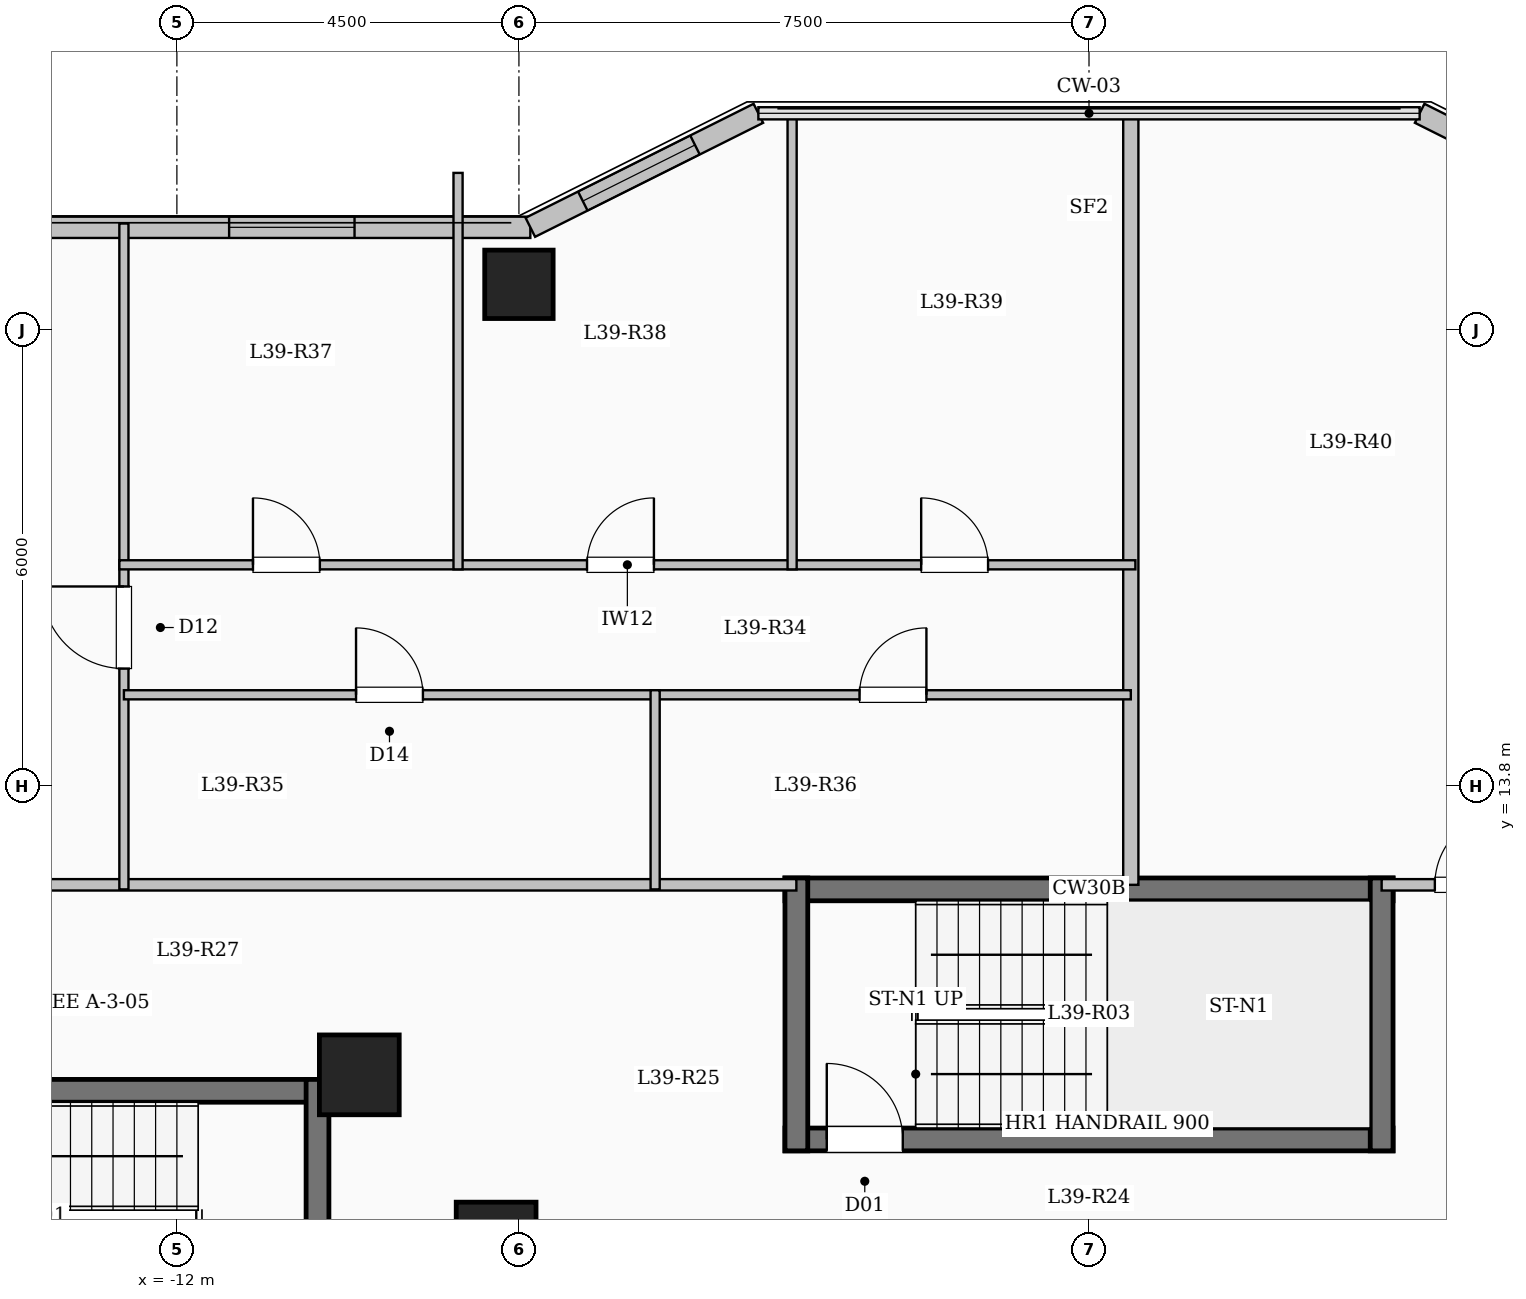
"""IFC4 building model, lengths in metres.
Left out: names, types, materials, properties, quantities, classifications, styles, units other than length and angle.
Written with IfcOpenShell. Run it as: python <this file> out.ifc"""

import sys

from ifc_helpers import new_model, si_unit, direction, frame, frame_2d, origin, origin_2d, place, context, subcontext, project, spatial, rectangle, extrude, element, fill, save


model = new_model("IFC4")
c1 = context("Model", 3, precision=1e-05, world=origin(), true_north=direction((0.0, 1.0)))
c2 = subcontext(c1, "Body", "Model", "MODEL_VIEW")
j1 = project(units=[si_unit("LENGTHUNIT", "METRE"), si_unit("PLANEANGLEUNIT", "RADIAN")], contexts=[c1])
p1 = place(None, origin())
s1 = spatial("IfcSite", under=j1, at=p1, CompositionType="ELEMENT")
p2 = place(p1, origin())
s2 = spatial("IfcBuilding", under=s1, at=p2, CompositionType="ELEMENT")
p3 = place(p2, frame((0.0, 0.0, 146.0)))
s3 = spatial("IfcBuildingStorey", under=s2, at=p3, CompositionType="ELEMENT", Elevation=146.0)
for number, where, z_axis, x_axis in (
    (1, (-7.8, 7.8, 0.0), (0.0, 0.0, 1.0), (1.0, 0.0, 0.0)),
    (2, (-9.6, 10.0, 0.0), (0.0, 0.0, 1.0), (1.0, 0.0, 0.0)),
):
    element("IfcColumn", number, at=place(p3, frame(where, z_axis=z_axis, x_axis=x_axis)), inside=s3, PredefinedType="COLUMN", context=c2, shape_type="SweptSolid", body=[
        extrude(rectangle(XDim=1.05, YDim=1.05, at=origin_2d()), origin(), (0.0, 0.0, 1.0), 3.35),
    ])
p4 = place(p3, frame((-7.5, 20.4, 0.0), z_axis=(0.0, 0.0, 1.0), x_axis=(1.0, 0.0, 0.0)))
e3 = element("IfcColumn", 3, at=p4, inside=s3, PredefinedType="COLUMN", context=c2, shape_type="SweptSolid", body=[
    extrude(rectangle(XDim=0.9, YDim=0.9, at=origin_2d()), origin(), (0.0, 0.0, 1.0), 3.35),
])
p5 = place(p3, frame((-19.65, 21.15, 0.0), z_axis=(0.0, 0.0, 1.0), x_axis=(1.0, 0.0, 0.0)))
e4 = element("IfcWall", 4, at=p5, inside=s3, PredefinedType="SOLIDWALL", context=c2, shape_type="SweptSolid", body=[
    extrude(rectangle(XDim=12.3, YDim=0.28, at=frame_2d((6.15, 0.0))), origin(), (0.0, 0.0, 1.0), 3.1),
])
p6 = place(p5, frame((2.414, 0.0, 0.9)))
e5 = element("IfcOpeningElement", 5, at=p6, cuts=e4, PredefinedType="OPENING", context=c2, shape_type="SweptSolid", body=[
    extrude(rectangle(XDim=2.2, YDim=1.75, at=frame_2d((1.1, 0.875))), frame((0.0, 0.15, 0.0), z_axis=(0.0, -1.0, 0.0), x_axis=(1.0, 0.0, 0.0)), (0.0, 0.0, 1.0), 0.3),
])
p7 = place(p5, frame((8.337, 0.0, 0.9)))
e6 = element("IfcOpeningElement", 6, at=p7, cuts=e4, PredefinedType="OPENING", context=c2, shape_type="SweptSolid", body=[
    extrude(rectangle(XDim=1.65, YDim=1.6, at=frame_2d((0.825, 0.8))), frame((0.0, 0.15, 0.0), z_axis=(0.0, -1.0, 0.0), x_axis=(1.0, 0.0, 0.0)), (0.0, 0.0, 1.0), 0.3),
])
p8 = place(p3, frame((-7.35, 21.15, 0.0), z_axis=(0.0, 0.0, 1.0), x_axis=(0.894427191, 0.4472135955, 0.0)))
e7 = element("IfcWall", 7, at=p8, inside=s3, PredefinedType="SOLIDWALL", context=c2, shape_type="SweptSolid", body=[
    extrude(rectangle(XDim=3.354, YDim=0.28, at=frame_2d((1.677, 0.0))), origin(), (0.0, 0.0, 1.0), 3.1),
])
p9 = place(p8, frame((0.772, 0.0, 0.9)))
e8 = element("IfcOpeningElement", 8, at=p9, cuts=e7, PredefinedType="OPENING", context=c2, shape_type="SweptSolid", body=[
    extrude(rectangle(XDim=1.65, YDim=1.6, at=frame_2d((0.825, 0.8))), frame((0.0, 0.15, 0.0), z_axis=(0.0, -1.0, 0.0), x_axis=(1.0, 0.0, 0.0)), (0.0, 0.0, 1.0), 0.3),
])
p10 = place(p3, frame((4.35, 22.65, 0.0), z_axis=(0.0, 0.0, 1.0), x_axis=(0.894427191, -0.4472135955, 0.0)))
e9 = element("IfcWall", 9, at=p10, inside=s3, PredefinedType="SOLIDWALL", context=c2, shape_type="SweptSolid", body=[
    extrude(rectangle(XDim=3.354, YDim=0.28, at=frame_2d((1.677, 0.0))), origin(), (0.0, 0.0, 1.0), 3.1),
])
p11 = place(p10, frame((1.653, 0.0, 0.95)))
e10 = element("IfcOpeningElement", 10, at=p11, cuts=e9, PredefinedType="OPENING", context=c2, shape_type="SweptSolid", body=[
    extrude(rectangle(XDim=1.2, YDim=1.5, at=frame_2d((0.6, 0.75))), frame((0.0, 0.15, 0.0), z_axis=(0.0, -1.0, 0.0), x_axis=(1.0, 0.0, 0.0)), (0.0, 0.0, 1.0), 0.3),
])
p12 = place(p3, frame((-18.0, 9.79, 0.0), z_axis=(0.0, 0.0, 1.0), x_axis=(1.0, 0.0, 0.0)))
e11 = element("IfcWall", 11, at=p12, inside=s3, PredefinedType="SHEAR", context=c2, shape_type="SweptSolid", body=[
    extrude(rectangle(XDim=8.0, YDim=0.3, at=frame_2d((4.0, 0.0))), origin(), (0.0, 0.0, 1.0), 3.35),
])
p13 = place(p3, frame((-10.15, 6.35, 0.0), z_axis=(0.0, 0.0, 1.0), x_axis=(0.0, 1.0, 0.0)))
e12 = element("IfcWall", 12, at=p13, inside=s3, PredefinedType="SHEAR", context=c2, shape_type="SweptSolid", body=[
    extrude(rectangle(XDim=3.59, YDim=0.3, at=frame_2d((1.795, 0.0))), origin(), (0.0, 0.0, 1.0), 3.35),
])
p14 = place(p3, frame((-4.0, 12.44, 0.0), z_axis=(0.0, 0.0, 1.0), x_axis=(1.0, 0.0, 0.0)))
e13 = element("IfcWall", 13, at=p14, inside=s3, PredefinedType="SHEAR", context=c2, shape_type="SweptSolid", body=[
    extrude(rectangle(XDim=8.0, YDim=0.3, at=frame_2d((4.0, 0.0))), origin(), (0.0, 0.0, 1.0), 3.35),
])
p15 = place(p3, frame((-4.0, 9.15, 0.0), z_axis=(0.0, 0.0, 1.0), x_axis=(1.0, 0.0, 0.0)))
e14 = element("IfcWall", 14, at=p15, inside=s3, PredefinedType="SHEAR", context=c2, shape_type="SweptSolid", body=[
    extrude(rectangle(XDim=8.0, YDim=0.3, at=frame_2d((4.0, 0.0))), origin(), (0.0, 0.0, 1.0), 3.35),
])
p16 = place(p15, frame((0.55, 0.0, 0.0)))
e15 = element("IfcOpeningElement", 15, at=p16, cuts=e14, PredefinedType="OPENING", context=c2, shape_type="SweptSolid", body=[
    extrude(rectangle(XDim=1.0, YDim=2.15, at=frame_2d((0.5, 1.075))), frame((0.0, 0.16, 0.0), z_axis=(0.0, -1.0, 0.0), x_axis=(1.0, 0.0, 0.0)), (0.0, 0.0, 1.0), 0.32),
])
for number, where, z_axis, x_axis in (
    (16, (-3.85, 9.0, 0.0), (0.0, 0.0, 1.0), (0.0, 1.0, 0.0)),
    (17, (3.85, 9.0, 0.0), (0.0, 0.0, 1.0), (0.0, 1.0, 0.0)),
):
    element("IfcWall", number, at=place(p3, frame(where, z_axis=z_axis, x_axis=x_axis)), inside=s3, PredefinedType="SHEAR", context=c2, shape_type="SweptSolid", body=[
        extrude(rectangle(XDim=3.59, YDim=0.3, at=frame_2d((1.795, 0.0))), origin(), (0.0, 0.0, 1.0), 3.35),
    ])
p17 = place(p3, frame((-19.55, 12.5, 0.0), z_axis=(0.0, 0.0, 1.0), x_axis=(1.0, 0.0, 0.0)))
e18 = element("IfcWall", 18, at=p17, inside=s3, PredefinedType="PARTITIONING", context=c2, shape_type="SweptSolid", body=[
    extrude(rectangle(XDim=15.7, YDim=0.15, at=frame_2d((7.85, 0.0))), origin(), (0.0, 0.0, 1.0), 3.1),
])
p18 = place(p17, frame((0.7, 0.0, 0.0)))
e19 = element("IfcOpeningElement", 19, at=p18, cuts=e18, PredefinedType="OPENING", context=c2, shape_type="SweptSolid", body=[
    extrude(rectangle(XDim=0.96, YDim=2.15, at=frame_2d((0.48, 1.075))), frame((0.0, 0.085, 0.0), z_axis=(0.0, -1.0, 0.0), x_axis=(1.0, 0.0, 0.0)), (0.0, 0.0, 1.0), 0.17),
])
p19 = place(p3, frame((3.85, 12.5, 0.0), z_axis=(0.0, 0.0, 1.0), x_axis=(1.0, 0.0, 0.0)))
e20 = element("IfcWall", 20, at=p19, inside=s3, PredefinedType="PARTITIONING", context=c2, shape_type="SweptSolid", body=[
    extrude(rectangle(XDim=15.7, YDim=0.15, at=frame_2d((7.85, 0.0))), origin(), (0.0, 0.0, 1.0), 3.1),
])
p20 = place(p19, frame((0.7, 0.0, 0.0)))
e21 = element("IfcOpeningElement", 21, at=p20, cuts=e20, PredefinedType="OPENING", context=c2, shape_type="SweptSolid", body=[
    extrude(rectangle(XDim=0.96, YDim=2.15, at=frame_2d((0.48, 1.075))), frame((0.0, 0.085, 0.0), z_axis=(0.0, -1.0, 0.0), x_axis=(1.0, 0.0, 0.0)), (0.0, 0.0, 1.0), 0.17),
])
p21 = place(p3, frame((0.55, 12.5, 0.0), z_axis=(0.0, 0.0, 1.0), x_axis=(0.0, 1.0, 0.0)))
e22 = element("IfcWall", 22, at=p21, inside=s3, PredefinedType="SOLIDWALL", context=c2, shape_type="SweptSolid", body=[
    extrude(rectangle(XDim=10.18, YDim=0.2, at=frame_2d((5.09, 0.0))), origin(), (0.0, 0.0, 1.0), 3.1),
])
p22 = place(p3, frame((-12.697, 12.44, 0.0), z_axis=(0.0, 0.0, 1.0), x_axis=(0.0, 1.0, 0.0)))
e23 = element("IfcWall", 23, at=p22, inside=s3, PredefinedType="PARTITIONING", context=c2, shape_type="SweptSolid", body=[
    extrude(rectangle(XDim=8.76, YDim=0.12, at=frame_2d((4.38, 0.0))), origin(), (0.0, 0.0, 1.0), 3.1),
])
p23 = place(p22, frame((2.905, 0.0, 0.0)))
e24 = element("IfcOpeningElement", 24, at=p23, cuts=e23, PredefinedType="OPENING", context=c2, shape_type="SweptSolid", body=[
    extrude(rectangle(XDim=1.08, YDim=2.15, at=frame_2d((0.54, 1.075))), frame((0.0, 0.07, 0.0), z_axis=(0.0, -1.0, 0.0), x_axis=(1.0, 0.0, 0.0)), (0.0, 0.0, 1.0), 0.14),
])
p24 = place(p3, frame((-12.697, 15.0, 0.0), z_axis=(0.0, 0.0, 1.0), x_axis=(1.0, 0.0, 0.0)))
e25 = element("IfcWall", 25, at=p24, inside=s3, PredefinedType="PARTITIONING", context=c2, shape_type="SweptSolid", body=[
    extrude(rectangle(XDim=6.989, YDim=0.12, at=frame_2d((3.495, 0.0))), origin(), (0.0, 0.0, 1.0), 3.1),
])
p25 = place(p24, frame((3.054, 0.0, 0.0)))
e26 = element("IfcOpeningElement", 26, at=p25, cuts=e25, PredefinedType="OPENING", context=c2, shape_type="SweptSolid", body=[
    extrude(rectangle(XDim=0.88, YDim=2.1, at=frame_2d((0.44, 1.05))), frame((0.0, 0.07, 0.0), z_axis=(0.0, -1.0, 0.0), x_axis=(1.0, 0.0, 0.0)), (0.0, 0.0, 1.0), 0.14),
])
p26 = place(p3, frame((-5.708, 15.0, 0.0), z_axis=(0.0, 0.0, 1.0), x_axis=(1.0, 0.0, 0.0)))
e27 = element("IfcWall", 27, at=p26, inside=s3, PredefinedType="PARTITIONING", context=c2, shape_type="SweptSolid", body=[
    extrude(rectangle(XDim=6.258, YDim=0.12, at=frame_2d((3.129, 0.0))), origin(), (0.0, 0.0, 1.0), 3.1),
])
p27 = place(p26, frame((2.689, 0.0, 0.0)))
e28 = element("IfcOpeningElement", 28, at=p27, cuts=e27, PredefinedType="OPENING", context=c2, shape_type="SweptSolid", body=[
    extrude(rectangle(XDim=0.88, YDim=2.1, at=frame_2d((0.44, 1.05))), frame((0.0, 0.07, 0.0), z_axis=(0.0, -1.0, 0.0), x_axis=(1.0, 0.0, 0.0)), (0.0, 0.0, 1.0), 0.14),
])
p28 = place(p3, frame((-12.757, 16.71, 0.0), z_axis=(0.0, 0.0, 1.0), x_axis=(1.0, 0.0, 0.0)))
e29 = element("IfcWall", 29, at=p28, inside=s3, PredefinedType="PARTITIONING", context=c2, shape_type="SweptSolid", body=[
    extrude(rectangle(XDim=13.367, YDim=0.12, at=frame_2d((6.684, 0.0))), origin(), (0.0, 0.0, 1.0), 3.1),
])
p29 = place(p28, frame((1.758, 0.0, 0.0)))
e30 = element("IfcOpeningElement", 30, at=p29, cuts=e29, PredefinedType="OPENING", context=c2, shape_type="SweptSolid", body=[
    extrude(rectangle(XDim=0.88, YDim=2.1, at=frame_2d((0.44, 1.05))), frame((0.0, 0.07, 0.0), z_axis=(0.0, -1.0, 0.0), x_axis=(1.0, 0.0, 0.0)), (0.0, 0.0, 1.0), 0.14),
])
p30 = place(p28, frame((6.153, 0.0, 0.0)))
e31 = element("IfcOpeningElement", 31, at=p30, cuts=e29, PredefinedType="OPENING", context=c2, shape_type="SweptSolid", body=[
    extrude(rectangle(XDim=0.88, YDim=2.1, at=frame_2d((0.44, 1.05))), frame((0.0, 0.07, 0.0), z_axis=(0.0, -1.0, 0.0), x_axis=(1.0, 0.0, 0.0)), (0.0, 0.0, 1.0), 0.14),
])
p31 = place(p28, frame((10.549, 0.0, 0.0)))
e32 = element("IfcOpeningElement", 32, at=p31, cuts=e29, PredefinedType="OPENING", context=c2, shape_type="SweptSolid", body=[
    extrude(rectangle(XDim=0.88, YDim=2.1, at=frame_2d((0.44, 1.05))), frame((0.0, 0.07, 0.0), z_axis=(0.0, -1.0, 0.0), x_axis=(1.0, 0.0, 0.0)), (0.0, 0.0, 1.0), 0.14),
])
p32 = place(p3, frame((-5.708, 12.44, 0.0), z_axis=(0.0, 0.0, 1.0), x_axis=(0.0, 1.0, 0.0)))
e33 = element("IfcWall", 33, at=p32, inside=s3, PredefinedType="PARTITIONING", context=c2, shape_type="SweptSolid", body=[
    extrude(rectangle(XDim=2.62, YDim=0.12, at=frame_2d((1.31, 0.0))), origin(), (0.0, 0.0, 1.0), 3.1),
])
p33 = place(p3, frame((-8.301, 16.65, 0.0), z_axis=(0.0, 0.0, 1.0), x_axis=(0.0, 1.0, 0.0)))
e34 = element("IfcWall", 34, at=p33, inside=s3, PredefinedType="PARTITIONING", context=c2, shape_type="SweptSolid", body=[
    extrude(rectangle(XDim=5.216, YDim=0.12, at=frame_2d((2.608, 0.0))), origin(), (0.0, 0.0, 1.0), 3.1),
])
p34 = place(p3, frame((-3.906, 16.65, 0.0), z_axis=(0.0, 0.0, 1.0), x_axis=(0.0, 1.0, 0.0)))
e35 = element("IfcWall", 35, at=p34, inside=s3, PredefinedType="PARTITIONING", context=c2, shape_type="SweptSolid", body=[
    extrude(rectangle(XDim=6.03, YDim=0.12, at=frame_2d((3.015, 0.0))), origin(), (0.0, 0.0, 1.0), 3.1),
])
p35 = place(p7, origin())
e36 = element("IfcWindow", 36, at=p35, inside=s3, PartitioningType="SINGLE_PANEL", PredefinedType="WINDOW", context=c2, shape_type="SweptSolid", body=[
    extrude(rectangle(XDim=1.65, YDim=1.6, at=frame_2d((0.825, 0.8))), frame((0.0, 0.03, 0.0), z_axis=(0.0, -1.0, 0.0), x_axis=(1.0, 0.0, 0.0)), (0.0, 0.0, 1.0), 0.06),
])
fill(e6, e36)
p36 = place(p9, origin())
e37 = element("IfcWindow", 37, at=p36, inside=s3, PartitioningType="SINGLE_PANEL", PredefinedType="WINDOW", context=c2, shape_type="SweptSolid", body=[
    extrude(rectangle(XDim=1.65, YDim=1.6, at=frame_2d((0.825, 0.8))), frame((0.0, 0.03, 0.0), z_axis=(0.0, -1.0, 0.0), x_axis=(1.0, 0.0, 0.0)), (0.0, 0.0, 1.0), 0.06),
])
fill(e8, e37)
p37 = place(p16, origin())
e38 = element("IfcDoor", 38, at=p37, inside=s3, OperationType="SINGLE_SWING_LEFT", PredefinedType="DOOR", context=c2, shape_type="SweptSolid", body=[
    extrude(rectangle(XDim=1.0, YDim=2.15, at=frame_2d((0.5, 1.075))), frame((0.0, 0.025, 0.0), z_axis=(0.0, -1.0, 0.0), x_axis=(1.0, 0.0, 0.0)), (0.0, 0.0, 1.0), 0.05),
])
fill(e15, e38)
p38 = place(p23, origin())
e39 = element("IfcDoor", 39, at=p38, inside=s3, OperationType="SINGLE_SWING_RIGHT", PredefinedType="DOOR", context=c2, shape_type="SweptSolid", body=[
    extrude(rectangle(XDim=1.08, YDim=2.15, at=frame_2d((0.54, 1.075))), frame((0.0, 0.025, 0.0), z_axis=(0.0, -1.0, 0.0), x_axis=(1.0, 0.0, 0.0)), (0.0, 0.0, 1.0), 0.05),
])
fill(e24, e39)
p39 = place(p25, origin())
e40 = element("IfcDoor", 40, at=p39, inside=s3, OperationType="SINGLE_SWING_LEFT", PredefinedType="DOOR", context=c2, shape_type="SweptSolid", body=[
    extrude(rectangle(XDim=0.88, YDim=2.1, at=frame_2d((0.44, 1.05))), frame((0.0, 0.025, 0.0), z_axis=(0.0, -1.0, 0.0), x_axis=(1.0, 0.0, 0.0)), (0.0, 0.0, 1.0), 0.05),
])
fill(e26, e40)
p40 = place(p27, origin())
e41 = element("IfcDoor", 41, at=p40, inside=s3, OperationType="SINGLE_SWING_RIGHT", PredefinedType="DOOR", context=c2, shape_type="SweptSolid", body=[
    extrude(rectangle(XDim=0.88, YDim=2.1, at=frame_2d((0.44, 1.05))), frame((0.0, 0.025, 0.0), z_axis=(0.0, -1.0, 0.0), x_axis=(1.0, 0.0, 0.0)), (0.0, 0.0, 1.0), 0.05),
])
fill(e28, e41)
p41 = place(p29, origin())
e42 = element("IfcDoor", 42, at=p41, inside=s3, OperationType="SINGLE_SWING_LEFT", PredefinedType="DOOR", context=c2, shape_type="SweptSolid", body=[
    extrude(rectangle(XDim=0.88, YDim=2.1, at=frame_2d((0.44, 1.05))), frame((0.0, 0.025, 0.0), z_axis=(0.0, -1.0, 0.0), x_axis=(1.0, 0.0, 0.0)), (0.0, 0.0, 1.0), 0.05),
])
fill(e30, e42)
p42 = place(p30, origin())
e43 = element("IfcDoor", 43, at=p42, inside=s3, OperationType="SINGLE_SWING_RIGHT", PredefinedType="DOOR", context=c2, shape_type="SweptSolid", body=[
    extrude(rectangle(XDim=0.88, YDim=2.1, at=frame_2d((0.44, 1.05))), frame((0.0, 0.025, 0.0), z_axis=(0.0, -1.0, 0.0), x_axis=(1.0, 0.0, 0.0)), (0.0, 0.0, 1.0), 0.05),
])
fill(e31, e43)
p43 = place(p31, origin())
e44 = element("IfcDoor", 44, at=p43, inside=s3, OperationType="SINGLE_SWING_LEFT", PredefinedType="DOOR", context=c2, shape_type="SweptSolid", body=[
    extrude(rectangle(XDim=0.88, YDim=2.1, at=frame_2d((0.44, 1.05))), frame((0.0, 0.025, 0.0), z_axis=(0.0, -1.0, 0.0), x_axis=(1.0, 0.0, 0.0)), (0.0, 0.0, 1.0), 0.05),
])
fill(e32, e44)
p44 = place(p20, origin())
e45 = element("IfcDoor", 45, at=p44, inside=s3, OperationType="SINGLE_SWING_RIGHT", PredefinedType="DOOR", context=c2, shape_type="SweptSolid", body=[
    extrude(rectangle(XDim=0.96, YDim=2.15, at=frame_2d((0.48, 1.075))), frame((0.0, 0.025, 0.0), z_axis=(0.0, -1.0, 0.0), x_axis=(1.0, 0.0, 0.0)), (0.0, 0.0, 1.0), 0.05),
])
fill(e21, e45)
save(model, sys.argv[1])
